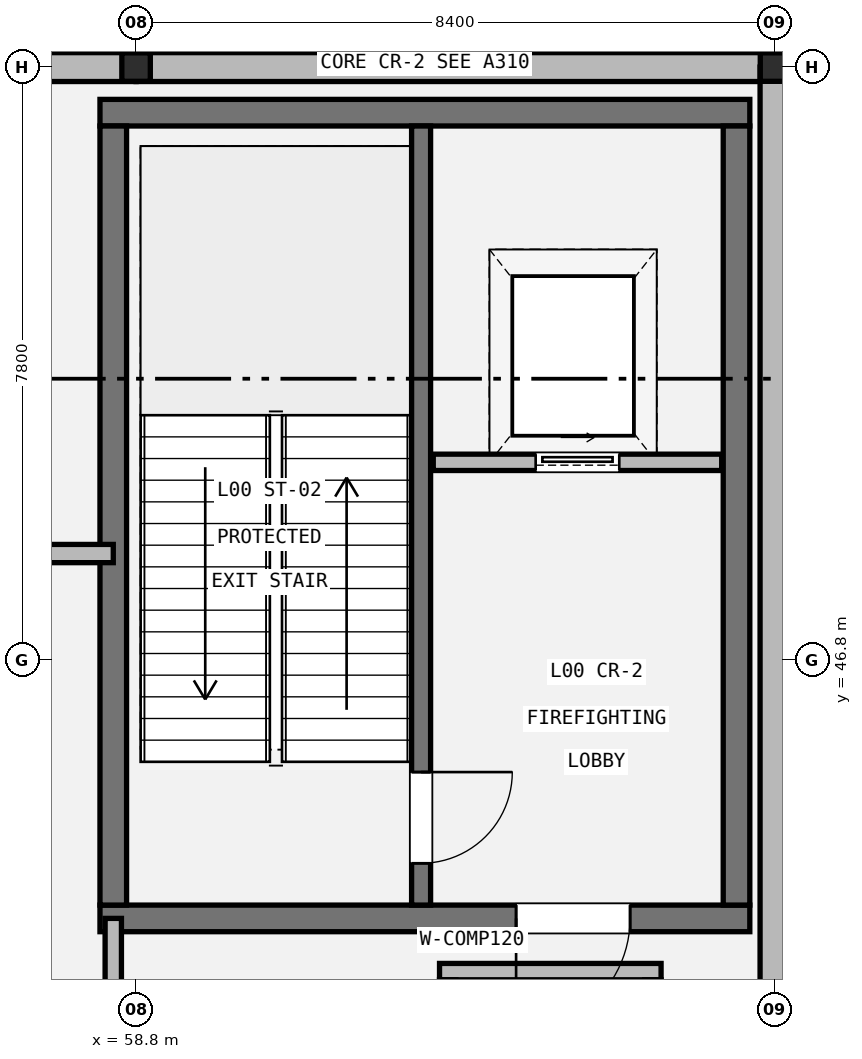
"""IFC4 building model, lengths in metres.
Left out: names, types, materials, properties, quantities, classifications, styles, units other than length and angle.
Written with IfcOpenShell. Run it as: python <this file> out.ifc"""

import sys

from ifc_helpers import new_model, si_unit, direction, frame, frame_2d, origin, origin_2d, place, context, subcontext, project, spatial, rectangle, i_section, extrude, element, fill, save


model = new_model("IFC4")
c1 = context("Model", 3, precision=1e-05, world=origin(), true_north=direction((0.0, 1.0)))
c2 = subcontext(c1, "Body", "Model", "MODEL_VIEW")
j1 = project(units=[si_unit("LENGTHUNIT", "METRE"), si_unit("PLANEANGLEUNIT", "RADIAN")], contexts=[c1])
p1 = place(None, origin())
s1 = spatial("IfcSite", under=j1, at=p1, CompositionType="ELEMENT")
p2 = place(p1, origin())
s2 = spatial("IfcBuilding", under=s1, at=p2, CompositionType="ELEMENT")
p3 = place(p2, origin())
s3 = spatial("IfcBuildingStorey", under=s2, at=p3, CompositionType="ELEMENT", Elevation=0.0)
for number, where, z_axis, x_axis in (
    (1, (58.8, 54.6, 0.0), (0.0, 0.0, 1.0), (1.0, 0.0, 0.0)),
    (2, (67.2, 54.6, 0.0), (0.0, 0.0, 1.0), (1.0, 0.0, 0.0)),
):
    element("IfcColumn", number, at=place(p3, frame(where, z_axis=z_axis, x_axis=x_axis)), inside=s3, PredefinedType="COLUMN", context=c2, shape_type="SweptSolid", body=[
        extrude(i_section(OverallWidth=0.375, OverallDepth=0.375, WebThickness=0.017, FlangeThickness=0.027, FilletRadius=0.015, at=origin_2d()), origin(), (0.0, 0.0, 1.0), 5.4),
    ])
p4 = place(p3, frame((50.4, 54.6, 0.0), z_axis=(0.0, 0.0, 1.0), x_axis=(1.0, 0.0, 0.0)))
e3 = element("IfcWall", 3, at=p4, inside=s3, PredefinedType="STANDARD", context=c2, shape_type="SweptSolid", body=[
    extrude(rectangle(XDim=8.4, YDim=0.38, at=frame_2d((4.2, 0.0))), origin(), (0.0, 0.0, 1.0), 4.632),
])
p5 = place(p4, frame((3.2, 0.0, 0.0)))
e4 = element("IfcOpeningElement", 4, at=p5, cuts=e3, PredefinedType="OPENING", context=c2, shape_type="SweptSolid", body=[
    extrude(rectangle(XDim=1.8, YDim=2.4, at=frame_2d((0.9, 1.2))), frame((0.0, 0.2, 0.0), z_axis=(0.0, -1.0, 0.0), x_axis=(1.0, 0.0, 0.0)), (0.0, 0.0, 1.0), 0.4),
])
p6 = place(p3, frame((58.8, 54.6, 0.0), z_axis=(0.0, 0.0, 1.0), x_axis=(1.0, 0.0, 0.0)))
e5 = element("IfcWall", 5, at=p6, inside=s3, PredefinedType="STANDARD", context=c2, shape_type="SweptSolid", body=[
    extrude(rectangle(XDim=8.4, YDim=0.38, at=frame_2d((4.2, 0.0))), origin(), (0.0, 0.0, 1.0), 4.402),
])
p7 = place(p3, frame((67.2, 54.6, 0.0), z_axis=(0.0, 0.0, 1.0), x_axis=(0.0, -1.0, 0.0)))
e6 = element("IfcWall", 6, at=p7, inside=s3, PredefinedType="STANDARD", context=c2, shape_type="SweptSolid", body=[
    extrude(rectangle(XDim=15.6, YDim=0.38, at=frame_2d((7.8, 0.0))), origin(), (0.0, 0.0, 1.0), 4.402),
])
p8 = place(p3, frame((66.875, 43.4, 0.0), z_axis=(0.0, 0.0, 1.0), x_axis=(-1.0, 0.0, 0.0)))
e7 = element("IfcWall", 7, at=p8, inside=s3, PredefinedType="SHEAR", context=c2, shape_type="SweptSolid", body=[
    extrude(rectangle(XDim=8.55, YDim=0.35, at=frame_2d((4.275, 0.0))), origin(), (0.0, 0.0, 1.0), 5.18),
])
p9 = place(p8, frame((1.575, 0.0, 0.0)))
e8 = element("IfcOpeningElement", 8, at=p9, cuts=e7, PredefinedType="OPENING", context=c2, shape_type="SweptSolid", body=[
    extrude(rectangle(XDim=1.5, YDim=2.15, at=frame_2d((0.75, 1.075))), frame((0.0, 0.185, 0.0), z_axis=(0.0, -1.0, 0.0), x_axis=(1.0, 0.0, 0.0)), (0.0, 0.0, 1.0), 0.37),
])
p10 = place(p3, frame((58.325, 54.0, 0.0), z_axis=(0.0, 0.0, 1.0), x_axis=(1.0, 0.0, 0.0)))
e9 = element("IfcWall", 9, at=p10, inside=s3, PredefinedType="SHEAR", context=c2, shape_type="SweptSolid", body=[
    extrude(rectangle(XDim=8.55, YDim=0.35, at=frame_2d((4.275, 0.0))), origin(), (0.0, 0.0, 1.0), 5.18),
])
for number, where, z_axis, x_axis in (
    (10, (58.5, 43.575, 0.0), (0.0, 0.0, 1.0), (0.0, 1.0, 0.0)),
    (11, (66.7, 53.825, 0.0), (0.0, 0.0, 1.0), (0.0, -1.0, 0.0)),
):
    element("IfcWall", number, at=place(p3, frame(where, z_axis=z_axis, x_axis=x_axis)), inside=s3, PredefinedType="SHEAR", context=c2, shape_type="SweptSolid", body=[
        extrude(rectangle(XDim=10.25, YDim=0.35, at=frame_2d((5.125, 0.0))), origin(), (0.0, 0.0, 1.0), 5.18),
    ])
p11 = place(p3, frame((62.55, 53.825, 0.0), z_axis=(0.0, 0.0, 1.0), x_axis=(0.0, -1.0, 0.0)))
e12 = element("IfcWall", 12, at=p11, inside=s3, PredefinedType="SHEAR", context=c2, shape_type="SweptSolid", body=[
    extrude(rectangle(XDim=10.25, YDim=0.25, at=frame_2d((5.125, 0.0))), origin(), (0.0, 0.0, 1.0), 5.18),
])
p12 = place(p11, frame((8.5, 0.0, 0.0)))
e13 = element("IfcOpeningElement", 13, at=p12, cuts=e12, PredefinedType="OPENING", context=c2, shape_type="SweptSolid", body=[
    extrude(rectangle(XDim=1.2, YDim=2.15, at=frame_2d((0.6, 1.075))), frame((0.0, 0.135, 0.0), z_axis=(0.0, -1.0, 0.0), x_axis=(1.0, 0.0, 0.0)), (0.0, 0.0, 1.0), 0.27),
])
p13 = place(p3, frame((62.71, 49.4, 0.0), z_axis=(0.0, 0.0, 1.0), x_axis=(1.0, 0.0, 0.0)))
e14 = element("IfcWall", 14, at=p13, inside=s3, PredefinedType="STANDARD", context=c2, shape_type="SweptSolid", body=[
    extrude(rectangle(XDim=3.795, YDim=0.215, at=frame_2d((1.897, 0.0))), origin(), (0.0, 0.0, 1.0), 5.172),
])
p14 = place(p13, frame((1.347, 0.0, 0.0)))
e15 = element("IfcOpeningElement", 15, at=p14, cuts=e14, PredefinedType="OPENING", context=c2, shape_type="SweptSolid", body=[
    extrude(rectangle(XDim=1.1, YDim=2.2, at=frame_2d((0.55, 1.1))), frame((0.0, 0.117, 0.0), z_axis=(0.0, -1.0, 0.0), x_axis=(1.0, 0.0, 0.0)), (0.0, 0.0, 1.0), 0.235),
])
p15 = place(p3, frame((62.792, 42.7, 0.0), z_axis=(0.0, 0.0, 1.0), x_axis=(1.0, 0.0, 0.0)))
e16 = element("IfcWall", 16, at=p15, inside=s3, PredefinedType="STANDARD", context=c2, shape_type="SweptSolid", body=[
    extrude(rectangle(XDim=2.915, YDim=0.215, at=frame_2d((1.458, 0.0))), origin(), (0.0, 0.0, 1.0), 5.172),
])
p16 = place(p3, frame((43.2, 48.2, 0.0), z_axis=(0.0, 0.0, 1.0), x_axis=(1.0, 0.0, 0.0)))
e17 = element("IfcWall", 17, at=p16, inside=s3, PredefinedType="PARTITIONING", context=c2, shape_type="SweptSolid", body=[
    extrude(rectangle(XDim=15.3, YDim=0.24, at=frame_2d((7.65, 0.0))), origin(), (0.0, 0.0, 1.0), 4.632),
])
p17 = place(p16, frame((3.87, 0.0, 0.0)))
e18 = element("IfcOpeningElement", 18, at=p17, cuts=e17, PredefinedType="OPENING", context=c2, shape_type="SweptSolid", body=[
    extrude(rectangle(XDim=2.4, YDim=2.7, at=frame_2d((1.2, 1.35))), frame((0.0, 0.13, 0.0), z_axis=(0.0, -1.0, 0.0), x_axis=(1.0, 0.0, 0.0)), (0.0, 0.0, 1.0), 0.26),
])
p18 = place(p3, frame((58.5, 23.4, 0.0), z_axis=(0.0, 0.0, 1.0), x_axis=(0.0, 1.0, 0.0)))
e19 = element("IfcWall", 19, at=p18, inside=s3, PredefinedType="STANDARD", context=c2, shape_type="SweptSolid", body=[
    extrude(rectangle(XDim=20.0, YDim=0.215, at=frame_2d((10.0, 0.0))), origin(), (0.0, 0.0, 1.0), 4.402),
])
p19 = place(p18, frame((8.055, 0.0, 0.0)))
e20 = element("IfcOpeningElement", 20, at=p19, cuts=e19, PredefinedType="OPENING", context=c2, shape_type="SweptSolid", body=[
    extrude(rectangle(XDim=2.1, YDim=2.5, at=frame_2d((1.05, 1.25))), frame((0.0, 0.117, 0.0), z_axis=(0.0, -1.0, 0.0), x_axis=(1.0, 0.0, 0.0)), (0.0, 0.0, 1.0), 0.235),
])
p20 = place(p12, origin())
e21 = element("IfcDoor", 21, at=p20, inside=s3, OperationType="SINGLE_SWING_LEFT", PredefinedType="DOOR", context=c2, shape_type="SweptSolid", body=[
    extrude(rectangle(XDim=1.2, YDim=2.15, at=frame_2d((0.6, 1.075))), frame((0.0, 0.025, 0.0), z_axis=(0.0, -1.0, 0.0), x_axis=(1.0, 0.0, 0.0)), (0.0, 0.0, 1.0), 0.05),
])
fill(e13, e21)
p21 = place(p9, origin())
e22 = element("IfcDoor", 22, at=p21, inside=s3, OperationType="SINGLE_SWING_RIGHT", PredefinedType="DOOR", context=c2, shape_type="SweptSolid", body=[
    extrude(rectangle(XDim=1.5, YDim=2.15, at=frame_2d((0.75, 1.075))), frame((0.0, 0.025, 0.0), z_axis=(0.0, -1.0, 0.0), x_axis=(1.0, 0.0, 0.0)), (0.0, 0.0, 1.0), 0.05),
])
fill(e8, e22)
p22 = place(p14, origin())
e23 = element("IfcDoor", 23, at=p22, inside=s3, OperationType="SLIDING_TO_RIGHT", PredefinedType="DOOR", context=c2, shape_type="SweptSolid", body=[
    extrude(rectangle(XDim=1.1, YDim=2.2, at=frame_2d((0.55, 1.1))), frame((0.0, 0.025, 0.0), z_axis=(0.0, -1.0, 0.0), x_axis=(1.0, 0.0, 0.0)), (0.0, 0.0, 1.0), 0.05),
])
fill(e15, e23)
save(model, sys.argv[1])
